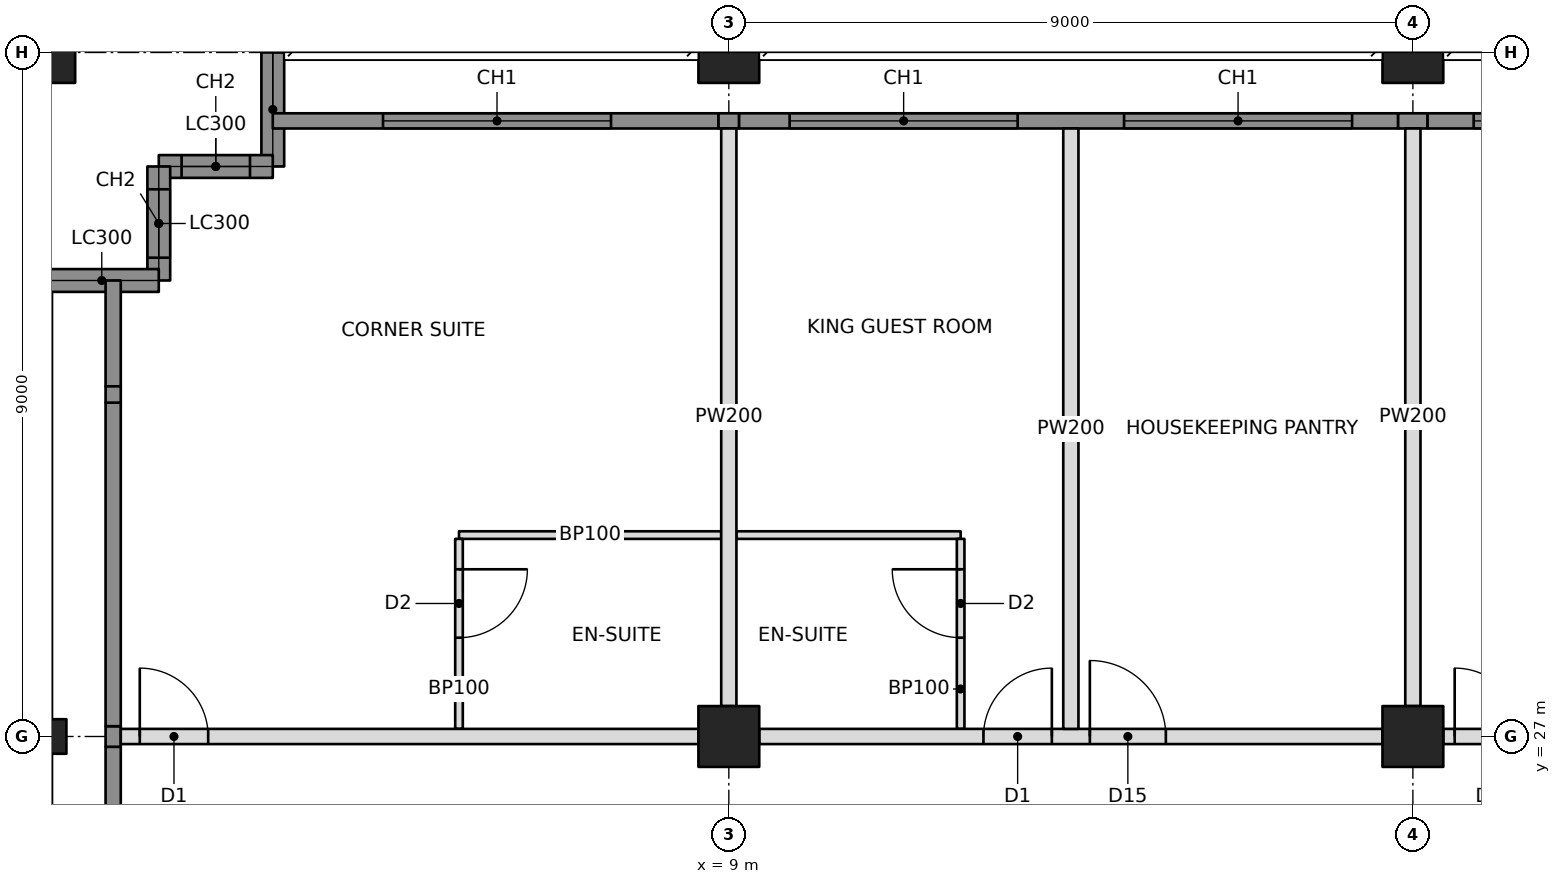
"""IFC4 building model, lengths in metres.
Left out: names, types, materials, properties, quantities, classifications, styles, units other than length and angle.
Written with IfcOpenShell. Run it as: python <this file> out.ifc"""

import sys

from ifc_helpers import new_model, si_unit, direction, frame, frame_2d, origin, origin_2d, place, context, subcontext, project, spatial, rectangle, hollow_rectangle, i_section, extrude, element, fill, save


model = new_model("IFC4")
c1 = context("Model", 3, precision=1e-05, world=origin(), true_north=direction((0.0, 1.0)))
c2 = subcontext(c1, "Body", "Model", "MODEL_VIEW")
j1 = project(units=[si_unit("LENGTHUNIT", "METRE"), si_unit("PLANEANGLEUNIT", "RADIAN")], contexts=[c1])
p1 = place(None, origin())
s1 = spatial("IfcSite", under=j1, at=p1, CompositionType="ELEMENT")
p2 = place(p1, origin())
s2 = spatial("IfcBuilding", under=s1, at=p2, CompositionType="ELEMENT")
p3 = place(p2, frame((0.0, 0.0, 82.4)))
s3 = spatial("IfcBuildingStorey", under=s2, at=p3, CompositionType="ELEMENT", Elevation=82.4)
p4 = place(p3, frame((0.0, 27.0, 0.0), z_axis=(0.0, 0.0, 1.0), x_axis=(0.0, 1.0, 0.0)))
e1 = element("IfcColumn", 1, at=p4, inside=s3, PredefinedType="COLUMN", context=c2, shape_type="SweptSolid", body=[
    extrude(i_section(OverallWidth=0.455, OverallDepth=0.569, WebThickness=0.078, FlangeThickness=0.125, at=origin_2d()), origin(), (0.0, 0.0, 1.0), 3.4),
])
p5 = place(p3, frame((0.0, 36.0, 0.0), z_axis=(0.0, 0.0, 1.0), x_axis=(1.0, 0.0, 0.0)))
e2 = element("IfcColumn", 2, at=p5, inside=s3, PredefinedType="COLUMN", context=c2, shape_type="SweptSolid", body=[
    extrude(hollow_rectangle(XDim=0.8, YDim=0.8, WallThickness=0.07, at=origin_2d()), origin(), (0.0, 0.0, 1.0), 3.4),
])
p6 = place(p3, frame((9.0, 27.0, 0.0), z_axis=(0.0, 0.0, 1.0), x_axis=(1.0, 0.0, 0.0)))
e3 = element("IfcColumn", 3, at=p6, inside=s3, PredefinedType="COLUMN", context=c2, shape_type="SweptSolid", body=[
    extrude(hollow_rectangle(XDim=0.8, YDim=0.8, WallThickness=0.09, at=origin_2d()), origin(), (0.0, 0.0, 1.0), 3.4),
])
p7 = place(p3, frame((9.0, 36.0, 0.0), z_axis=(0.0, 0.0, 1.0), x_axis=(1.0, 0.0, 0.0)))
e4 = element("IfcColumn", 4, at=p7, inside=s3, PredefinedType="COLUMN", context=c2, shape_type="SweptSolid", body=[
    extrude(hollow_rectangle(XDim=0.8, YDim=0.8, WallThickness=0.07, at=origin_2d()), origin(), (0.0, 0.0, 1.0), 3.4),
])
p8 = place(p3, frame((18.0, 27.0, 0.0), z_axis=(0.0, 0.0, 1.0), x_axis=(1.0, 0.0, 0.0)))
e5 = element("IfcColumn", 5, at=p8, inside=s3, PredefinedType="COLUMN", context=c2, shape_type="SweptSolid", body=[
    extrude(hollow_rectangle(XDim=0.8, YDim=0.8, WallThickness=0.09, at=origin_2d()), origin(), (0.0, 0.0, 1.0), 3.4),
])
p9 = place(p3, frame((18.0, 36.0, 0.0), z_axis=(0.0, 0.0, 1.0), x_axis=(1.0, 0.0, 0.0)))
e6 = element("IfcColumn", 6, at=p9, inside=s3, PredefinedType="COLUMN", context=c2, shape_type="SweptSolid", body=[
    extrude(hollow_rectangle(XDim=0.8, YDim=0.8, WallThickness=0.07, at=origin_2d()), origin(), (0.0, 0.0, 1.0), 3.4),
])
p10 = place(p3, frame((3.0, 36.0, 0.0), z_axis=(0.0, 0.0, 1.0), x_axis=(0.0, -1.0, 0.0)))
e7 = element("IfcWall", 7, at=p10, inside=s3, PredefinedType="SOLIDWALL", context=c2, shape_type="SweptSolid", body=[
    extrude(rectangle(XDim=1.5, YDim=0.3, at=frame_2d((0.75, 0.0))), origin(), (0.0, 0.0, 1.0), 2.42),
])
p11 = place(p3, frame((3.0, 34.5, 0.0), z_axis=(0.0, 0.0, 1.0), x_axis=(-1.0, 0.0, 0.0)))
e8 = element("IfcWall", 8, at=p11, inside=s3, PredefinedType="SOLIDWALL", context=c2, shape_type="SweptSolid", body=[
    extrude(rectangle(XDim=1.5, YDim=0.3, at=frame_2d((0.75, 0.0))), origin(), (0.0, 0.0, 1.0), 3.2),
])
p12 = place(p11, frame((0.3, 0.0, 0.6)))
e9 = element("IfcOpeningElement", 9, at=p12, cuts=e8, PredefinedType="OPENING", context=c2, shape_type="SweptSolid", body=[
    extrude(rectangle(XDim=0.9, YDim=2.2, at=frame_2d((0.45, 1.1))), frame((0.0, 0.16, 0.0), z_axis=(0.0, -1.0, 0.0), x_axis=(1.0, 0.0, 0.0)), (0.0, 0.0, 1.0), 0.32),
])
p13 = place(p3, frame((1.5, 34.5, 0.0), z_axis=(0.0, 0.0, 1.0), x_axis=(0.0, -1.0, 0.0)))
e10 = element("IfcWall", 10, at=p13, inside=s3, PredefinedType="SOLIDWALL", context=c2, shape_type="SweptSolid", body=[
    extrude(rectangle(XDim=1.5, YDim=0.3, at=frame_2d((0.75, 0.0))), origin(), (0.0, 0.0, 1.0), 3.2),
])
p14 = place(p13, frame((0.3, 0.0, 0.6)))
e11 = element("IfcOpeningElement", 11, at=p14, cuts=e10, PredefinedType="OPENING", context=c2, shape_type="SweptSolid", body=[
    extrude(rectangle(XDim=0.9, YDim=2.2, at=frame_2d((0.45, 1.1))), frame((0.0, 0.16, 0.0), z_axis=(0.0, -1.0, 0.0), x_axis=(1.0, 0.0, 0.0)), (0.0, 0.0, 1.0), 0.32),
])
p15 = place(p3, frame((1.5, 33.0, 0.0), z_axis=(0.0, 0.0, 1.0), x_axis=(-1.0, 0.0, 0.0)))
e12 = element("IfcWall", 12, at=p15, inside=s3, PredefinedType="SOLIDWALL", context=c2, shape_type="SweptSolid", body=[
    extrude(rectangle(XDim=1.5, YDim=0.3, at=frame_2d((0.75, 0.0))), origin(), (0.0, 0.0, 1.0), 2.42),
])
p16 = place(p3, frame((3.0, 35.1, 0.0), z_axis=(0.0, 0.0, 1.0), x_axis=(1.0, 0.0, 0.0)))
e13 = element("IfcWall", 13, at=p16, inside=s3, PredefinedType="SOLIDWALL", context=c2, shape_type="SweptSolid", body=[
    extrude(rectangle(XDim=5.865, YDim=0.2, at=frame_2d((2.932, 0.0))), origin(), (0.0, 0.0, 1.0), 3.2),
])
p17 = place(p16, frame((1.45, 0.0, 0.6)))
e14 = element("IfcOpeningElement", 14, at=p17, cuts=e13, PredefinedType="OPENING", context=c2, shape_type="SweptSolid", body=[
    extrude(rectangle(XDim=3.0, YDim=2.2, at=frame_2d((1.5, 1.1))), frame((0.0, 0.11, 0.0), z_axis=(0.0, -1.0, 0.0), x_axis=(1.0, 0.0, 0.0)), (0.0, 0.0, 1.0), 0.22),
])
p18 = place(p3, frame((1.0, 27.0, 0.0), z_axis=(0.0, 0.0, 1.0), x_axis=(1.0, 0.0, 0.0)))
e15 = element("IfcWall", 15, at=p18, inside=s3, PredefinedType="PARTITIONING", context=c2, shape_type="SweptSolid", body=[
    extrude(rectangle(XDim=7.6, YDim=0.2, at=frame_2d((3.8, 0.0))), origin(), (0.0, 0.0, 1.0), 2.438),
])
p19 = place(p18, frame((0.25, 0.0, 0.0)))
e16 = element("IfcOpeningElement", 16, at=p19, cuts=e15, PredefinedType="OPENING", context=c2, shape_type="SweptSolid", body=[
    extrude(rectangle(XDim=0.9, YDim=2.1, at=frame_2d((0.45, 1.05))), frame((0.0, 0.11, 0.0), z_axis=(0.0, -1.0, 0.0), x_axis=(1.0, 0.0, 0.0)), (0.0, 0.0, 1.0), 0.22),
])
p20 = place(p3, frame((9.4, 27.0, 0.0), z_axis=(0.0, 0.0, 1.0), x_axis=(1.0, 0.0, 0.0)))
e17 = element("IfcWall", 17, at=p20, inside=s3, PredefinedType="PARTITIONING", context=c2, shape_type="SweptSolid", body=[
    extrude(rectangle(XDim=8.2, YDim=0.2, at=frame_2d((4.1, 0.0))), origin(), (0.0, 0.0, 1.0), 2.405),
])
p21 = place(p20, frame((2.95, 0.0, 0.0)))
e18 = element("IfcOpeningElement", 18, at=p21, cuts=e17, PredefinedType="OPENING", context=c2, shape_type="SweptSolid", body=[
    extrude(rectangle(XDim=0.9, YDim=2.1, at=frame_2d((0.45, 1.05))), frame((0.0, 0.11, 0.0), z_axis=(0.0, -1.0, 0.0), x_axis=(1.0, 0.0, 0.0)), (0.0, 0.0, 1.0), 0.22),
])
p22 = place(p20, frame((4.35, 0.0, 0.0)))
e19 = element("IfcOpeningElement", 19, at=p22, cuts=e17, PredefinedType="OPENING", context=c2, shape_type="SweptSolid", body=[
    extrude(rectangle(XDim=1.0, YDim=2.1, at=frame_2d((0.5, 1.05))), frame((0.0, 0.11, 0.0), z_axis=(0.0, -1.0, 0.0), x_axis=(1.0, 0.0, 0.0)), (0.0, 0.0, 1.0), 0.22),
])
p23 = place(p3, frame((18.4, 27.0, 0.0), z_axis=(0.0, 0.0, 1.0), x_axis=(1.0, 0.0, 0.0)))
e20 = element("IfcWall", 20, at=p23, inside=s3, PredefinedType="PARTITIONING", context=c2, shape_type="SweptSolid", body=[
    extrude(rectangle(XDim=8.2, YDim=0.2, at=frame_2d((4.1, 0.0))), origin(), (0.0, 0.0, 1.0), 2.405),
])
p24 = place(p23, frame((0.15, 0.0, 0.0)))
e21 = element("IfcOpeningElement", 21, at=p24, cuts=e20, PredefinedType="OPENING", context=c2, shape_type="SweptSolid", body=[
    extrude(rectangle(XDim=0.9, YDim=2.1, at=frame_2d((0.45, 1.05))), frame((0.0, 0.11, 0.0), z_axis=(0.0, -1.0, 0.0), x_axis=(1.0, 0.0, 0.0)), (0.0, 0.0, 1.0), 0.22),
])
p25 = place(p3, frame((9.0, 27.4, 0.0), z_axis=(0.0, 0.0, 1.0), x_axis=(0.0, 1.0, 0.0)))
e22 = element("IfcWall", 22, at=p25, inside=s3, PredefinedType="PARTITIONING", context=c2, shape_type="SweptSolid", body=[
    extrude(rectangle(XDim=7.6, YDim=0.2, at=frame_2d((3.8, 0.0))), origin(), (0.0, 0.0, 1.0), 2.438),
])
p26 = place(p3, frame((13.5, 27.1, 0.0), z_axis=(0.0, 0.0, 1.0), x_axis=(0.0, 1.0, 0.0)))
e23 = element("IfcWall", 23, at=p26, inside=s3, PredefinedType="PARTITIONING", context=c2, shape_type="SweptSolid", body=[
    extrude(rectangle(XDim=7.9, YDim=0.2, at=frame_2d((3.95, 0.0))), origin(), (0.0, 0.0, 1.0), 2.404),
])
p27 = place(p3, frame((18.0, 27.4, 0.0), z_axis=(0.0, 0.0, 1.0), x_axis=(0.0, 1.0, 0.0)))
e24 = element("IfcWall", 24, at=p27, inside=s3, PredefinedType="PARTITIONING", context=c2, shape_type="SweptSolid", body=[
    extrude(rectangle(XDim=7.6, YDim=0.2, at=frame_2d((3.8, 0.0))), origin(), (0.0, 0.0, 1.0), 2.405),
])
p28 = place(p3, frame((5.45, 29.65, 0.0), z_axis=(0.0, 0.0, 1.0), x_axis=(1.0, 0.0, 0.0)))
e25 = element("IfcWall", 25, at=p28, inside=s3, PredefinedType="PARTITIONING", context=c2, shape_type="SweptSolid", body=[
    extrude(rectangle(XDim=3.45, YDim=0.1, at=frame_2d((1.725, 0.0))), origin(), (0.0, 0.0, 1.0), 2.438),
])
p29 = place(p3, frame((5.45, 27.1, 0.0), z_axis=(0.0, 0.0, 1.0), x_axis=(0.0, 1.0, 0.0)))
e26 = element("IfcWall", 26, at=p29, inside=s3, PredefinedType="PARTITIONING", context=c2, shape_type="SweptSolid", body=[
    extrude(rectangle(XDim=2.5, YDim=0.1, at=frame_2d((1.25, 0.0))), origin(), (0.0, 0.0, 1.0), 2.438),
])
p30 = place(p29, frame((1.2, 0.0, 0.0)))
e27 = element("IfcOpeningElement", 27, at=p30, cuts=e26, PredefinedType="OPENING", context=c2, shape_type="SweptSolid", body=[
    extrude(rectangle(XDim=0.9, YDim=2.1, at=frame_2d((0.45, 1.05))), frame((0.0, 0.06, 0.0), z_axis=(0.0, -1.0, 0.0), x_axis=(1.0, 0.0, 0.0)), (0.0, 0.0, 1.0), 0.12),
])
p31 = place(p3, frame((9.1, 29.65, 0.0), z_axis=(0.0, 0.0, 1.0), x_axis=(1.0, 0.0, 0.0)))
e28 = element("IfcWall", 28, at=p31, inside=s3, PredefinedType="PARTITIONING", context=c2, shape_type="SweptSolid", body=[
    extrude(rectangle(XDim=2.95, YDim=0.1, at=frame_2d((1.475, 0.0))), origin(), (0.0, 0.0, 1.0), 2.438),
])
p32 = place(p3, frame((12.05, 27.1, 0.0), z_axis=(0.0, 0.0, 1.0), x_axis=(0.0, 1.0, 0.0)))
e29 = element("IfcWall", 29, at=p32, inside=s3, PredefinedType="PARTITIONING", context=c2, shape_type="SweptSolid", body=[
    extrude(rectangle(XDim=2.5, YDim=0.1, at=frame_2d((1.25, 0.0))), origin(), (0.0, 0.0, 1.0), 2.404),
])
p33 = place(p32, frame((1.2, 0.0, 0.0)))
e30 = element("IfcOpeningElement", 30, at=p33, cuts=e29, PredefinedType="OPENING", context=c2, shape_type="SweptSolid", body=[
    extrude(rectangle(XDim=0.9, YDim=2.1, at=frame_2d((0.45, 1.05))), frame((0.0, 0.06, 0.0), z_axis=(0.0, -1.0, 0.0), x_axis=(1.0, 0.0, 0.0)), (0.0, 0.0, 1.0), 0.12),
])
p34 = place(p3, frame((0.9, 18.194, 0.0), z_axis=(0.0, 0.0, 1.0), x_axis=(0.0, 1.0, 0.0)))
e31 = element("IfcWall", 31, at=p34, inside=s3, PredefinedType="SOLIDWALL", context=c2, shape_type="SweptSolid", body=[
    extrude(rectangle(XDim=8.671, YDim=0.2, at=frame_2d((4.335, 0.0))), origin(), (0.0, 0.0, 1.0), 3.2),
])
p35 = place(p34, frame((0.156, 0.0, 0.6)))
e32 = element("IfcOpeningElement", 32, at=p35, cuts=e31, PredefinedType="OPENING", context=c2, shape_type="SweptSolid", body=[
    extrude(rectangle(XDim=3.0, YDim=2.2, at=frame_2d((1.5, 1.1))), frame((0.0, 0.11, 0.0), z_axis=(0.0, -1.0, 0.0), x_axis=(1.0, 0.0, 0.0)), (0.0, 0.0, 1.0), 0.22),
])
p36 = place(p34, frame((3.656, 0.0, 0.6)))
e33 = element("IfcOpeningElement", 33, at=p36, cuts=e31, PredefinedType="OPENING", context=c2, shape_type="SweptSolid", body=[
    extrude(rectangle(XDim=3.0, YDim=2.2, at=frame_2d((1.5, 1.1))), frame((0.0, 0.11, 0.0), z_axis=(0.0, -1.0, 0.0), x_axis=(1.0, 0.0, 0.0)), (0.0, 0.0, 1.0), 0.22),
])
p37 = place(p3, frame((0.9, 26.865, 0.0), z_axis=(0.0, 0.0, 1.0), x_axis=(0.0, 1.0, 0.0)))
e34 = element("IfcWall", 34, at=p37, inside=s3, PredefinedType="SOLIDWALL", context=c2, shape_type="SweptSolid", body=[
    extrude(rectangle(XDim=0.271, YDim=0.2, at=frame_2d((0.135, 0.0))), origin(), (0.0, 0.0, 1.0), 2.438),
])
p38 = place(p3, frame((0.9, 27.135, 0.0), z_axis=(0.0, 0.0, 1.0), x_axis=(0.0, 1.0, 0.0)))
e35 = element("IfcWall", 35, at=p38, inside=s3, PredefinedType="SOLIDWALL", context=c2, shape_type="SweptSolid", body=[
    extrude(rectangle(XDim=4.257, YDim=0.2, at=frame_2d((2.129, 0.0))), origin(), (0.0, 0.0, 1.0), 3.2),
])
p39 = place(p3, frame((0.9, 31.393, 0.0), z_axis=(0.0, 0.0, 1.0), x_axis=(0.0, 1.0, 0.0)))
e36 = element("IfcWall", 36, at=p39, inside=s3, PredefinedType="SOLIDWALL", context=c2, shape_type="SweptSolid", body=[
    extrude(rectangle(XDim=0.215, YDim=0.2, at=frame_2d((0.107, 0.0))), origin(), (0.0, 0.0, 1.0), 2.661),
])
p40 = place(p3, frame((0.9, 31.607, 0.0), z_axis=(0.0, 0.0, 1.0), x_axis=(0.0, 1.0, 0.0)))
e37 = element("IfcWall", 37, at=p40, inside=s3, PredefinedType="SOLIDWALL", context=c2, shape_type="SweptSolid", body=[
    extrude(rectangle(XDim=1.393, YDim=0.2, at=frame_2d((0.696, 0.0))), origin(), (0.0, 0.0, 1.0), 3.2),
])
p41 = place(p3, frame((8.865, 35.1, 0.0), z_axis=(0.0, 0.0, 1.0), x_axis=(1.0, 0.0, 0.0)))
e38 = element("IfcWall", 38, at=p41, inside=s3, PredefinedType="SOLIDWALL", context=c2, shape_type="SweptSolid", body=[
    extrude(rectangle(XDim=0.271, YDim=0.2, at=frame_2d((0.135, 0.0))), origin(), (0.0, 0.0, 1.0), 2.438),
])
p42 = place(p3, frame((9.135, 35.1, 0.0), z_axis=(0.0, 0.0, 1.0), x_axis=(1.0, 0.0, 0.0)))
e39 = element("IfcWall", 39, at=p42, inside=s3, PredefinedType="SOLIDWALL", context=c2, shape_type="SweptSolid", body=[
    extrude(rectangle(XDim=8.671, YDim=0.2, at=frame_2d((4.335, 0.0))), origin(), (0.0, 0.0, 1.0), 3.2),
])
p43 = place(p42, frame((0.665, 0.0, 0.6)))
e40 = element("IfcOpeningElement", 40, at=p43, cuts=e39, PredefinedType="OPENING", context=c2, shape_type="SweptSolid", body=[
    extrude(rectangle(XDim=3.0, YDim=2.2, at=frame_2d((1.5, 1.1))), frame((0.0, 0.11, 0.0), z_axis=(0.0, -1.0, 0.0), x_axis=(1.0, 0.0, 0.0)), (0.0, 0.0, 1.0), 0.22),
])
p44 = place(p42, frame((5.065, 0.0, 0.6)))
e41 = element("IfcOpeningElement", 41, at=p44, cuts=e39, PredefinedType="OPENING", context=c2, shape_type="SweptSolid", body=[
    extrude(rectangle(XDim=3.0, YDim=2.2, at=frame_2d((1.5, 1.1))), frame((0.0, 0.11, 0.0), z_axis=(0.0, -1.0, 0.0), x_axis=(1.0, 0.0, 0.0)), (0.0, 0.0, 1.0), 0.22),
])
p45 = place(p3, frame((17.806, 35.1, 0.0), z_axis=(0.0, 0.0, 1.0), x_axis=(1.0, 0.0, 0.0)))
e42 = element("IfcWall", 42, at=p45, inside=s3, PredefinedType="SOLIDWALL", context=c2, shape_type="SweptSolid", body=[
    extrude(rectangle(XDim=0.388, YDim=0.2, at=frame_2d((0.194, 0.0))), origin(), (0.0, 0.0, 1.0), 2.404),
])
p46 = place(p3, frame((18.194, 35.1, 0.0), z_axis=(0.0, 0.0, 1.0), x_axis=(1.0, 0.0, 0.0)))
e43 = element("IfcWall", 43, at=p46, inside=s3, PredefinedType="SOLIDWALL", context=c2, shape_type="SweptSolid", body=[
    extrude(rectangle(XDim=8.612, YDim=0.2, at=frame_2d((4.306, 0.0))), origin(), (0.0, 0.0, 1.0), 3.2),
])
p47 = place(p46, frame((0.606, 0.0, 0.6)))
e44 = element("IfcOpeningElement", 44, at=p47, cuts=e43, PredefinedType="OPENING", context=c2, shape_type="SweptSolid", body=[
    extrude(rectangle(XDim=3.0, YDim=2.2, at=frame_2d((1.5, 1.1))), frame((0.0, 0.11, 0.0), z_axis=(0.0, -1.0, 0.0), x_axis=(1.0, 0.0, 0.0)), (0.0, 0.0, 1.0), 0.22),
])
p48 = place(p46, frame((5.006, 0.0, 0.6)))
e45 = element("IfcOpeningElement", 45, at=p48, cuts=e43, PredefinedType="OPENING", context=c2, shape_type="SweptSolid", body=[
    extrude(rectangle(XDim=3.0, YDim=2.2, at=frame_2d((1.5, 1.1))), frame((0.0, 0.11, 0.0), z_axis=(0.0, -1.0, 0.0), x_axis=(1.0, 0.0, 0.0)), (0.0, 0.0, 1.0), 0.22),
])
p49 = place(p12, origin())
e46 = element("IfcWindow", 46, at=p49, inside=s3, PartitioningType="SINGLE_PANEL", PredefinedType="WINDOW", context=c2, shape_type="SweptSolid", body=[
    extrude(rectangle(XDim=0.9, YDim=2.2, at=frame_2d((0.45, 1.1))), frame((0.0, 0.03, 0.0), z_axis=(0.0, -1.0, 0.0), x_axis=(1.0, 0.0, 0.0)), (0.0, 0.0, 1.0), 0.06),
])
fill(e9, e46)
p50 = place(p14, origin())
e47 = element("IfcWindow", 47, at=p50, inside=s3, PartitioningType="SINGLE_PANEL", PredefinedType="WINDOW", context=c2, shape_type="SweptSolid", body=[
    extrude(rectangle(XDim=0.9, YDim=2.2, at=frame_2d((0.45, 1.1))), frame((0.0, 0.03, 0.0), z_axis=(0.0, -1.0, 0.0), x_axis=(1.0, 0.0, 0.0)), (0.0, 0.0, 1.0), 0.06),
])
fill(e11, e47)
p51 = place(p17, origin())
e48 = element("IfcWindow", 48, at=p51, inside=s3, PartitioningType="TRIPLE_PANEL_VERTICAL", PredefinedType="WINDOW", context=c2, shape_type="SweptSolid", body=[
    extrude(rectangle(XDim=3.0, YDim=2.2, at=frame_2d((1.5, 1.1))), frame((0.0, 0.03, 0.0), z_axis=(0.0, -1.0, 0.0), x_axis=(1.0, 0.0, 0.0)), (0.0, 0.0, 1.0), 0.06),
])
fill(e14, e48)
p52 = place(p43, origin())
e49 = element("IfcWindow", 49, at=p52, inside=s3, PartitioningType="TRIPLE_PANEL_VERTICAL", PredefinedType="WINDOW", context=c2, shape_type="SweptSolid", body=[
    extrude(rectangle(XDim=3.0, YDim=2.2, at=frame_2d((1.5, 1.1))), frame((0.0, 0.03, 0.0), z_axis=(0.0, -1.0, 0.0), x_axis=(1.0, 0.0, 0.0)), (0.0, 0.0, 1.0), 0.06),
])
fill(e40, e49)
p53 = place(p44, origin())
e50 = element("IfcWindow", 50, at=p53, inside=s3, PartitioningType="TRIPLE_PANEL_VERTICAL", PredefinedType="WINDOW", context=c2, shape_type="SweptSolid", body=[
    extrude(rectangle(XDim=3.0, YDim=2.2, at=frame_2d((1.5, 1.1))), frame((0.0, 0.03, 0.0), z_axis=(0.0, -1.0, 0.0), x_axis=(1.0, 0.0, 0.0)), (0.0, 0.0, 1.0), 0.06),
])
fill(e41, e50)
p54 = place(p47, origin())
e51 = element("IfcWindow", 51, at=p54, inside=s3, PartitioningType="TRIPLE_PANEL_VERTICAL", PredefinedType="WINDOW", context=c2, shape_type="SweptSolid", body=[
    extrude(rectangle(XDim=3.0, YDim=2.2, at=frame_2d((1.5, 1.1))), frame((0.0, 0.03, 0.0), z_axis=(0.0, -1.0, 0.0), x_axis=(1.0, 0.0, 0.0)), (0.0, 0.0, 1.0), 0.06),
])
fill(e44, e51)
p55 = place(p30, frame((0.9, 0.0, 0.0), z_axis=(0.0, 0.0, 1.0), x_axis=(-1.0, 0.0, 0.0)))
e52 = element("IfcDoor", 52, at=p55, inside=s3, OperationType="SINGLE_SWING_LEFT", PredefinedType="DOOR", context=c2, shape_type="SweptSolid", body=[
    extrude(rectangle(XDim=0.9, YDim=2.1, at=frame_2d((0.45, 1.05))), frame((0.0, 0.025, 0.0), z_axis=(0.0, -1.0, 0.0), x_axis=(1.0, 0.0, 0.0)), (0.0, 0.0, 1.0), 0.05),
])
fill(e27, e52)
p56 = place(p19, origin())
e53 = element("IfcDoor", 53, at=p56, inside=s3, OperationType="SINGLE_SWING_LEFT", PredefinedType="DOOR", context=c2, shape_type="SweptSolid", body=[
    extrude(rectangle(XDim=0.9, YDim=2.1, at=frame_2d((0.45, 1.05))), frame((0.0, 0.025, 0.0), z_axis=(0.0, -1.0, 0.0), x_axis=(1.0, 0.0, 0.0)), (0.0, 0.0, 1.0), 0.05),
])
fill(e16, e53)
p57 = place(p33, origin())
e54 = element("IfcDoor", 54, at=p57, inside=s3, OperationType="SINGLE_SWING_RIGHT", PredefinedType="DOOR", context=c2, shape_type="SweptSolid", body=[
    extrude(rectangle(XDim=0.9, YDim=2.1, at=frame_2d((0.45, 1.05))), frame((0.0, 0.025, 0.0), z_axis=(0.0, -1.0, 0.0), x_axis=(1.0, 0.0, 0.0)), (0.0, 0.0, 1.0), 0.05),
])
fill(e30, e54)
p58 = place(p21, origin())
e55 = element("IfcDoor", 55, at=p58, inside=s3, OperationType="SINGLE_SWING_RIGHT", PredefinedType="DOOR", context=c2, shape_type="SweptSolid", body=[
    extrude(rectangle(XDim=0.9, YDim=2.1, at=frame_2d((0.45, 1.05))), frame((0.0, 0.025, 0.0), z_axis=(0.0, -1.0, 0.0), x_axis=(1.0, 0.0, 0.0)), (0.0, 0.0, 1.0), 0.05),
])
fill(e18, e55)
p59 = place(p22, origin())
e56 = element("IfcDoor", 56, at=p59, inside=s3, OperationType="SINGLE_SWING_LEFT", PredefinedType="DOOR", context=c2, shape_type="SweptSolid", body=[
    extrude(rectangle(XDim=1.0, YDim=2.1, at=frame_2d((0.5, 1.05))), frame((0.0, 0.025, 0.0), z_axis=(0.0, -1.0, 0.0), x_axis=(1.0, 0.0, 0.0)), (0.0, 0.0, 1.0), 0.05),
])
fill(e19, e56)
p60 = place(p24, origin())
e57 = element("IfcDoor", 57, at=p60, inside=s3, OperationType="SINGLE_SWING_LEFT", PredefinedType="DOOR", context=c2, shape_type="SweptSolid", body=[
    extrude(rectangle(XDim=0.9, YDim=2.1, at=frame_2d((0.45, 1.05))), frame((0.0, 0.025, 0.0), z_axis=(0.0, -1.0, 0.0), x_axis=(1.0, 0.0, 0.0)), (0.0, 0.0, 1.0), 0.05),
])
fill(e21, e57)
save(model, sys.argv[1])
